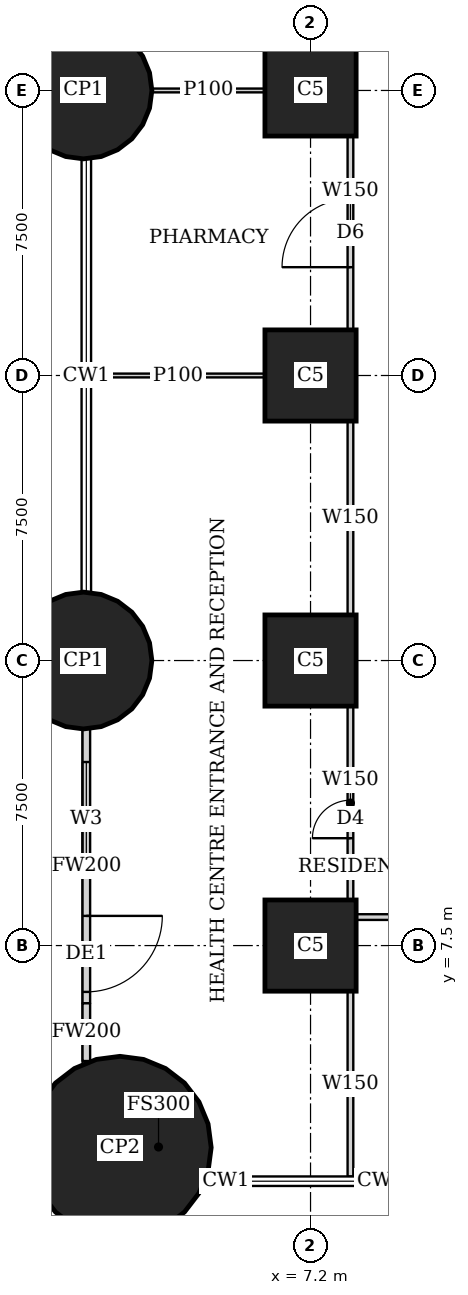
"""IFC4 building model, lengths in metres.
Left out: names, types, materials, properties, quantities, classifications, styles, units other than length and angle.
Written with IfcOpenShell. Run it as: python <this file> out.ifc"""

import sys

from ifc_helpers import new_model, si_unit, direction, frame, frame_2d, origin, origin_2d, place, context, subcontext, project, spatial, rectangle, circle, extrude, element, fill, save


model = new_model("IFC4")
c1 = context("Model", 3, precision=1e-05, world=origin(), true_north=direction((0.0, 1.0)))
c2 = subcontext(c1, "Body", "Model", "MODEL_VIEW")
j1 = project(units=[si_unit("LENGTHUNIT", "METRE"), si_unit("PLANEANGLEUNIT", "RADIAN")], contexts=[c1])
p1 = place(None, origin())
s1 = spatial("IfcSite", under=j1, at=p1, CompositionType="ELEMENT")
p2 = place(p1, origin())
s2 = spatial("IfcBuilding", under=s1, at=p2, CompositionType="ELEMENT")
p3 = place(p2, origin())
s3 = spatial("IfcBuildingStorey", under=s2, at=p3, CompositionType="ELEMENT", Elevation=0.0)
p4 = place(p3, frame((2.186, 2.186, 0.0), z_axis=(0.0, 0.0, 1.0), x_axis=(1.0, 0.0, 0.0)))
e1 = element("IfcColumn", 1, at=p4, inside=s3, PredefinedType="COLUMN", context=c2, shape_type="SweptSolid", body=[
    extrude(circle(Radius=2.4, at=origin_2d()), origin(), (0.0, 0.0, 1.0), 5.6),
])
p5 = place(p3, frame((7.2, 7.5, 0.0), z_axis=(0.0, 0.0, 1.0), x_axis=(1.0, 0.0, 0.0)))
e2 = element("IfcColumn", 2, at=p5, inside=s3, PredefinedType="COLUMN", context=c2, shape_type="SweptSolid", body=[
    extrude(rectangle(XDim=2.4, YDim=2.4, at=origin_2d()), origin(), (0.0, 0.0, 1.0), 5.6),
])
p6 = place(p3, frame((1.225, 15.0, 0.0), z_axis=(0.0, 0.0, 1.0), x_axis=(1.0, 0.0, 0.0)))
e3 = element("IfcColumn", 3, at=p6, inside=s3, PredefinedType="COLUMN", context=c2, shape_type="SweptSolid", body=[
    extrude(circle(Radius=1.8, at=origin_2d()), origin(), (0.0, 0.0, 1.0), 5.6),
])
for number, where, z_axis, x_axis in (
    (4, (7.2, 15.0, 0.0), (0.0, 0.0, 1.0), (1.0, 0.0, 0.0)),
    (5, (7.2, 22.5, 0.0), (0.0, 0.0, 1.0), (1.0, 0.0, 0.0)),
):
    element("IfcColumn", number, at=place(p3, frame(where, z_axis=z_axis, x_axis=x_axis)), inside=s3, PredefinedType="COLUMN", context=c2, shape_type="SweptSolid", body=[
        extrude(rectangle(XDim=2.4, YDim=2.4, at=origin_2d()), origin(), (0.0, 0.0, 1.0), 5.6),
    ])
p7 = place(p3, frame((1.225, 30.0, 0.0), z_axis=(0.0, 0.0, 1.0), x_axis=(1.0, 0.0, 0.0)))
e6 = element("IfcColumn", 6, at=p7, inside=s3, PredefinedType="COLUMN", context=c2, shape_type="SweptSolid", body=[
    extrude(circle(Radius=1.8, at=origin_2d()), origin(), (0.0, 0.0, 1.0), 5.6),
])
p8 = place(p3, frame((7.2, 30.0, 0.0), z_axis=(0.0, 0.0, 1.0), x_axis=(1.0, 0.0, 0.0)))
e7 = element("IfcColumn", 7, at=p8, inside=s3, PredefinedType="COLUMN", context=c2, shape_type="SweptSolid", body=[
    extrude(rectangle(XDim=2.4, YDim=2.4, at=origin_2d()), origin(), (0.0, 0.0, 1.0), 5.6),
])
p9 = place(p3, frame((1.3, 13.199, 0.0), z_axis=(0.0, 0.0, 1.0), x_axis=(0.0, -1.0, 0.0)))
e8 = element("IfcWall", 8, at=p9, inside=s3, PredefinedType="SOLIDWALL", context=c2, shape_type="SweptSolid", body=[
    extrude(rectangle(XDim=7.218, YDim=0.2, at=frame_2d((3.609, 0.0))), origin(), (0.0, 0.0, 1.0), 3.5),
])
p10 = place(p9, frame((4.918, 0.0, 0.0)))
e9 = element("IfcOpeningElement", 9, at=p10, cuts=e8, PredefinedType="OPENING", context=c2, shape_type="SweptSolid", body=[
    extrude(rectangle(XDim=2.0, YDim=2.4, at=frame_2d((1.0, 1.2))), frame((0.0, 0.11, 0.0), z_axis=(0.0, -1.0, 0.0), x_axis=(1.0, 0.0, 0.0)), (0.0, 0.0, 1.0), 0.22),
])
p11 = place(p9, frame((0.869, 0.0, 0.3)))
e10 = element("IfcOpeningElement", 10, at=p11, cuts=e8, PredefinedType="OPENING", context=c2, shape_type="SweptSolid", body=[
    extrude(rectangle(XDim=3.0, YDim=3.1, at=frame_2d((1.5, 1.55))), frame((0.0, 0.11, 0.0), z_axis=(0.0, -1.0, 0.0), x_axis=(1.0, 0.0, 0.0)), (0.0, 0.0, 1.0), 0.22),
])
p12 = place(p3, frame((1.3, 5.981, 0.0), z_axis=(0.0, 0.0, 1.0), x_axis=(0.0, -1.0, 0.0)))
e11 = element("IfcWall", 11, at=p12, inside=s3, PredefinedType="SOLIDWALL", context=c2, shape_type="SweptSolid", body=[
    extrude(rectangle(XDim=1.519, YDim=0.2, at=frame_2d((0.76, 0.0))), origin(), (0.0, 0.0, 1.0), 5.3),
])
p13 = place(p3, frame((8.25, 1.425, 0.0), z_axis=(0.0, 0.0, 1.0), x_axis=(0.0, 1.0, 0.0)))
e12 = element("IfcWall", 12, at=p13, inside=s3, PredefinedType="SOLIDWALL", context=c2, shape_type="SweptSolid", body=[
    extrude(rectangle(XDim=4.874, YDim=0.15, at=frame_2d((2.437, 0.0))), origin(), (0.0, 0.0, 1.0), 3.5),
])
p14 = place(p3, frame((8.25, 8.701, 0.0), z_axis=(0.0, 0.0, 1.0), x_axis=(0.0, 1.0, 0.0)))
e13 = element("IfcWall", 13, at=p14, inside=s3, PredefinedType="SOLIDWALL", context=c2, shape_type="SweptSolid", body=[
    extrude(rectangle(XDim=5.098, YDim=0.15, at=frame_2d((2.549, 0.0))), origin(), (0.0, 0.0, 1.0), 5.3),
])
p15 = place(p14, frame((1.624, 0.0, 0.0)))
e14 = element("IfcOpeningElement", 14, at=p15, cuts=e13, PredefinedType="OPENING", context=c2, shape_type="SweptSolid", body=[
    extrude(rectangle(XDim=1.0, YDim=2.1, at=frame_2d((0.5, 1.05))), frame((0.0, 0.085, 0.0), z_axis=(0.0, -1.0, 0.0), x_axis=(1.0, 0.0, 0.0)), (0.0, 0.0, 1.0), 0.17),
])
p16 = place(p3, frame((8.25, 16.201, 0.0), z_axis=(0.0, 0.0, 1.0), x_axis=(0.0, 1.0, 0.0)))
e15 = element("IfcWall", 15, at=p16, inside=s3, PredefinedType="SOLIDWALL", context=c2, shape_type="SweptSolid", body=[
    extrude(rectangle(XDim=5.098, YDim=0.15, at=frame_2d((2.549, 0.0))), origin(), (0.0, 0.0, 1.0), 5.3),
])
p17 = place(p3, frame((8.25, 23.701, 0.0), z_axis=(0.0, 0.0, 1.0), x_axis=(0.0, 1.0, 0.0)))
e16 = element("IfcWall", 16, at=p17, inside=s3, PredefinedType="SOLIDWALL", context=c2, shape_type="SweptSolid", body=[
    extrude(rectangle(XDim=5.098, YDim=0.15, at=frame_2d((2.549, 0.0))), origin(), (0.0, 0.0, 1.0), 5.3),
])
p18 = place(p17, frame((1.649, 0.0, 0.0)))
e17 = element("IfcOpeningElement", 17, at=p18, cuts=e16, PredefinedType="OPENING", context=c2, shape_type="SweptSolid", body=[
    extrude(rectangle(XDim=1.8, YDim=2.1, at=frame_2d((0.9, 1.05))), frame((0.0, 0.085, 0.0), z_axis=(0.0, -1.0, 0.0), x_axis=(1.0, 0.0, 0.0)), (0.0, 0.0, 1.0), 0.17),
])
p19 = place(p3, frame((13.199, 8.25, 0.0), z_axis=(0.0, 0.0, 1.0), x_axis=(-1.0, 0.0, 0.0)))
e18 = element("IfcWall", 18, at=p19, inside=s3, PredefinedType="SOLIDWALL", context=c2, shape_type="SweptSolid", body=[
    extrude(rectangle(XDim=4.798, YDim=0.15, at=frame_2d((2.399, 0.0))), origin(), (0.0, 0.0, 1.0), 3.7),
])
p20 = place(p3, frame((1.425, 22.5, 0.0), z_axis=(0.0, 0.0, 1.0), x_axis=(1.0, 0.0, 0.0)))
e19 = element("IfcWall", 19, at=p20, inside=s3, PredefinedType="PARTITIONING", context=c2, shape_type="SweptSolid", body=[
    extrude(rectangle(XDim=4.574, YDim=0.1, at=frame_2d((2.287, 0.0))), origin(), (0.0, 0.0, 1.0), 3.5),
])
p21 = place(p3, frame((3.026, 30.0, 0.0), z_axis=(0.0, 0.0, 1.0), x_axis=(1.0, 0.0, 0.0)))
e20 = element("IfcWall", 20, at=p21, inside=s3, PredefinedType="PARTITIONING", context=c2, shape_type="SweptSolid", body=[
    extrude(rectangle(XDim=2.973, YDim=0.1, at=frame_2d((1.487, 0.0))), origin(), (0.0, 0.0, 1.0), 3.7),
])
p22 = place(p10, origin())
e21 = element("IfcDoor", 21, at=p22, inside=s3, OperationType="DOUBLE_DOOR_SINGLE_SWING", PredefinedType="DOOR", context=c2, shape_type="SweptSolid", body=[
    extrude(rectangle(XDim=2.0, YDim=2.4, at=frame_2d((1.0, 1.2))), frame((0.0, 0.025, 0.0), z_axis=(0.0, -1.0, 0.0), x_axis=(1.0, 0.0, 0.0)), (0.0, 0.0, 1.0), 0.05),
])
fill(e9, e21)
p23 = place(p11, origin())
e22 = element("IfcWindow", 22, at=p23, inside=s3, PartitioningType="SINGLE_PANEL", PredefinedType="WINDOW", context=c2, shape_type="SweptSolid", body=[
    extrude(rectangle(XDim=3.0, YDim=3.1, at=frame_2d((1.5, 1.55))), frame((0.0, 0.03, 0.0), z_axis=(0.0, -1.0, 0.0), x_axis=(1.0, 0.0, 0.0)), (0.0, 0.0, 1.0), 0.06),
])
fill(e10, e22)
p24 = place(p15, origin())
e23 = element("IfcDoor", 23, at=p24, inside=s3, OperationType="SINGLE_SWING_LEFT", PredefinedType="DOOR", context=c2, shape_type="SweptSolid", body=[
    extrude(rectangle(XDim=1.0, YDim=2.1, at=frame_2d((0.5, 1.05))), frame((0.0, 0.025, 0.0), z_axis=(0.0, -1.0, 0.0), x_axis=(1.0, 0.0, 0.0)), (0.0, 0.0, 1.0), 0.05),
])
fill(e14, e23)
p25 = place(p18, origin())
e24 = element("IfcDoor", 24, at=p25, inside=s3, OperationType="DOUBLE_DOOR_SINGLE_SWING", PredefinedType="DOOR", context=c2, shape_type="SweptSolid", body=[
    extrude(rectangle(XDim=1.8, YDim=2.1, at=frame_2d((0.9, 1.05))), frame((0.0, 0.025, 0.0), z_axis=(0.0, -1.0, 0.0), x_axis=(1.0, 0.0, 0.0)), (0.0, 0.0, 1.0), 0.05),
])
fill(e17, e24)
save(model, sys.argv[1])
